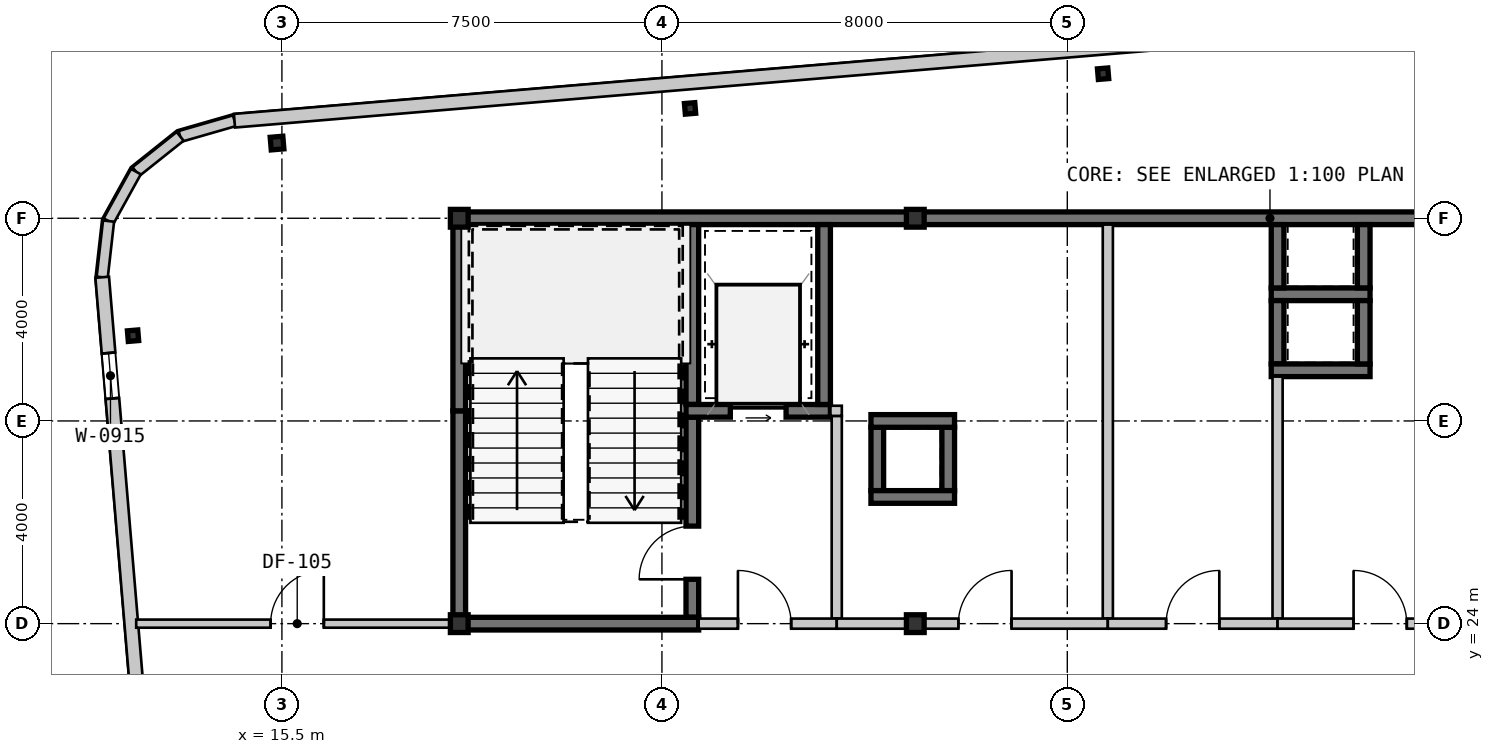
"""IFC4 building model, lengths in metres.
Left out: names, types, materials, properties, quantities, classifications, styles, units other than length and angle.
Written with IfcOpenShell. Run it as: python <this file> out.ifc"""

import sys

from ifc_helpers import new_model, si_unit, direction, frame, frame_2d, origin, origin_2d, place, context, subcontext, project, spatial, rectangle, hollow_rectangle, i_section, extrude, source, transform, mapped, element, fill, save


model = new_model("IFC4")
c1 = context("Model", 3, precision=1e-05, world=origin(), true_north=direction((0.0, 1.0)))
c2 = subcontext(c1, "Body", "Model", "MODEL_VIEW")
j1 = project(units=[si_unit("LENGTHUNIT", "METRE"), si_unit("PLANEANGLEUNIT", "RADIAN")], contexts=[c1])
p1 = place(None, origin())
s1 = spatial("IfcSite", under=j1, at=p1, CompositionType="ELEMENT")
p2 = place(p1, origin())
s2 = spatial("IfcBuilding", under=s1, at=p2, CompositionType="ELEMENT")
p3 = place(p2, frame((0.0, 0.0, 207.2)))
s3 = spatial("IfcBuildingStorey", under=s2, at=p3, CompositionType="ELEMENT", Elevation=207.2)
m1 = source(origin(), c2, "Body", "SweptSolid", [
    extrude(hollow_rectangle(XDim=0.35, YDim=0.35, WallThickness=0.016, at=origin_2d()), origin(), (0.0, 0.0, 1.0), 4.2),
])
for number, where, z_axis, x_axis in (
    (1, (19.0, 24.0, 0.0), (0.0, 0.0, 1.0), (1.0, 0.0, 0.0)),
    (2, (28.0, 24.0, 0.0), (0.0, 0.0, 1.0), (1.0, 0.0, 0.0)),
    (3, (19.0, 32.0, 0.0), (0.0, 0.0, 1.0), (1.0, 0.0, 0.0)),
    (4, (28.0, 32.0, 0.0), (0.0, 0.0, 1.0), (1.0, 0.0, 0.0)),
):
    element("IfcColumn", number, at=place(p3, frame(where, z_axis=z_axis, x_axis=x_axis)), inside=s3, PredefinedType="COLUMN", context=c2, shape_type="MappedRepresentation", body=[
        mapped(m1, transform((0.0, 0.0, 0.0), scale=1.0)),
    ])
m2 = source(origin(), c2, "Body", "SweptSolid", [
    extrude(hollow_rectangle(XDim=0.25, YDim=0.25, WallThickness=0.01, at=origin_2d()), origin(), (0.0, 0.0, 1.0), 4.2),
])
p4 = place(p3, frame((15.404, 33.484, 0.0), z_axis=(0.0, 0.0, 1.0), x_axis=(0.99649285925, 0.083677843332, 0.0)))
e5 = element("IfcColumn", 5, at=p4, inside=s3, PredefinedType="COLUMN", context=c2, shape_type="MappedRepresentation", body=[
    mapped(m2, transform((0.0, 0.0, 0.0), scale=1.0)),
])
m3 = source(origin(), c2, "Body", "SweptSolid", [
    extrude(i_section(OverallWidth=0.205, OverallDepth=0.21, WebThickness=0.009, FlangeThickness=0.014, at=origin_2d()), origin(), (0.0, 0.0, 1.0), 4.2),
])
for number, where, z_axis, x_axis in (
    (6, (23.555, 34.168, 0.0), (0.0, 0.0, 1.0), (0.996, 0.084, 0.0)),
    (7, (31.706, 34.853, 0.0), (0.0, 0.0, 1.0), (0.996, 0.084, 0.0)),
    (8, (12.562, 29.682, 0.0), (0.0, 0.0, 1.0), (0.996, 0.084, 0.0)),
):
    element("IfcColumn", number, at=place(p3, frame(where, z_axis=z_axis, x_axis=x_axis)), inside=s3, PredefinedType="COLUMN", context=c2, shape_type="MappedRepresentation", body=[
        mapped(m3, transform((0.0, 0.0, 0.0), scale=1.0)),
    ])
m4 = source(origin(), c2, "Body", "SweptSolid", [
    extrude(rectangle(XDim=1.116, YDim=0.22, at=frame_2d((0.558, 0.0))), origin(), (0.0, 0.0, 1.0), 3.78),
])
p5 = place(p3, frame((14.564, 33.925, 0.0), z_axis=(0.0, 0.0, 1.0), x_axis=(-0.961010464297, -0.276512002475, 0.0)))
e9 = element("IfcWall", 9, at=p5, inside=s3, PredefinedType="SOLIDWALL", context=c2, shape_type="MappedRepresentation", body=[
    mapped(m4, transform((0.0, 0.0, 0.0), scale=1.0)),
])
m5 = source(origin(), c2, "Body", "SweptSolid", [
    extrude(rectangle(XDim=1.116, YDim=0.22, at=frame_2d((0.558, 0.0))), origin(), (0.0, 0.0, 1.0), 3.78),
])
p6 = place(p3, frame((13.491, 33.616, 0.0), z_axis=(0.0, 0.0, 1.0), x_axis=(-0.782062884215, -0.623199522732, 0.0)))
e10 = element("IfcWall", 10, at=p6, inside=s3, PredefinedType="SOLIDWALL", context=c2, shape_type="MappedRepresentation", body=[
    mapped(m5, transform((0.0, 0.0, 0.0), scale=1.0)),
])
for number, where, z_axis, x_axis in (
    (11, (12.619, 32.921, 0.0), (0.0, 0.0, 1.0), (-0.484, -0.875, 0.0)),
    (12, (12.079, 31.944, 0.0), (0.0, 0.0, 1.0), (-0.112, -0.994, 0.0)),
):
    element("IfcWall", number, at=place(p3, frame(where, z_axis=z_axis, x_axis=x_axis)), inside=s3, PredefinedType="SOLIDWALL", context=c2, shape_type="MappedRepresentation", body=[
        mapped(m4, transform((0.0, 0.0, 0.0), scale=1.0)),
    ])
m6 = source(origin(), c2, "Body", "SweptSolid", [
    extrude(rectangle(XDim=42.5, YDim=0.27, at=frame_2d((21.25, 0.0))), origin(), (0.0, 0.0, 1.0), 3.78),
])
p7 = place(p3, frame((56.915, 37.481, 0.0), z_axis=(0.0, 0.0, 1.0), x_axis=(-0.996492667128, -0.083680131217, 0.0)))
e13 = element("IfcWall", 13, at=p7, inside=s3, PredefinedType="SOLIDWALL", context=c2, shape_type="MappedRepresentation", body=[
    mapped(m6, transform((0.0, 0.0, 0.0), scale=1.0)),
])
m7 = source(origin(), c2, "Body", "SweptSolid", [
    extrude(rectangle(XDim=0.9, YDim=1.5, at=frame_2d((0.45, 0.75))), frame((0.0, 0.145, 0.0), z_axis=(0.0, -1.0, 0.0), x_axis=(1.0, 0.0, 0.0)), (0.0, 0.0, 1.0), 0.29),
])
p8 = place(p7, frame((1.25, 0.0, 1.1)))
e14 = element("IfcOpeningElement", 14, at=p8, cuts=e13, PredefinedType="OPENING", context=c2, shape_type="MappedRepresentation", body=[
    mapped(m7, transform((0.0, 0.0, 0.0), scale=1.0)),
])
m8 = source(origin(), c2, "Body", "SweptSolid", [
    extrude(rectangle(XDim=26.8, YDim=0.27, at=frame_2d((13.4, 0.0))), origin(), (0.0, 0.0, 1.0), 3.78),
])
p9 = place(p3, frame((11.953, 30.835, 0.0), z_axis=(0.0, 0.0, 1.0), x_axis=(0.083673473834, -0.996493226157, 0.0)))
e15 = element("IfcWall", 15, at=p9, inside=s3, PredefinedType="SOLIDWALL", context=c2, shape_type="MappedRepresentation", body=[
    mapped(m8, transform((0.0, 0.0, 0.0), scale=1.0)),
])
p10 = place(p9, frame((1.5, 0.0, 0.7)))
e16 = element("IfcOpeningElement", 16, at=p10, cuts=e15, PredefinedType="OPENING", context=c2, shape_type="MappedRepresentation", body=[
    mapped(m7, transform((0.0, 0.0, 0.0), scale=1.0)),
])
m9 = source(origin(), c2, "Body", "SweptSolid", [
    extrude(rectangle(XDim=9.125, YDim=0.25, at=frame_2d((4.562, 0.0))), origin(), (0.0, 0.0, 1.0), 3.78),
])
p11 = place(p3, frame((18.875, 32.0, 0.0), z_axis=(0.0, 0.0, 1.0), x_axis=(1.0, 0.0, 0.0)))
e17 = element("IfcWall", 17, at=p11, inside=s3, PredefinedType="SHEAR", context=c2, shape_type="MappedRepresentation", body=[
    mapped(m9, transform((0.0, 0.0, 0.0), scale=1.0)),
])
m10 = source(origin(), c2, "Body", "SweptSolid", [
    extrude(rectangle(XDim=11.2, YDim=0.25, at=frame_2d((5.6, 0.0))), origin(), (0.0, 0.0, 1.0), 3.78),
])
p12 = place(p3, frame((28.0, 32.0, 0.0), z_axis=(0.0, 0.0, 1.0), x_axis=(1.0, 0.0, 0.0)))
e18 = element("IfcWall", 18, at=p12, inside=s3, PredefinedType="SHEAR", context=c2, shape_type="MappedRepresentation", body=[
    mapped(m10, transform((0.0, 0.0, 0.0), scale=1.0)),
])
m11 = source(origin(), c2, "Body", "SweptSolid", [
    extrude(rectangle(XDim=4.075, YDim=0.25, at=frame_2d((2.038, 0.0))), origin(), (0.0, 0.0, 1.0), 3.78),
])
p13 = place(p3, frame((19.0, 24.125, 0.0), z_axis=(0.0, 0.0, 1.0), x_axis=(0.0, 1.0, 0.0)))
e19 = element("IfcWall", 19, at=p13, inside=s3, PredefinedType="SHEAR", context=c2, shape_type="MappedRepresentation", body=[
    mapped(m11, transform((0.0, 0.0, 0.0), scale=1.0)),
])
m12 = source(origin(), c2, "Body", "SweptSolid", [
    extrude(rectangle(XDim=3.675, YDim=0.25, at=frame_2d((1.837, 0.0))), origin(), (0.0, 0.0, 1.0), 3.78),
])
p14 = place(p3, frame((19.0, 28.2, 0.0), z_axis=(0.0, 0.0, 1.0), x_axis=(0.0, 1.0, 0.0)))
e20 = element("IfcWall", 20, at=p14, inside=s3, PredefinedType="SHEAR", context=c2, shape_type="MappedRepresentation", body=[
    mapped(m12, transform((0.0, 0.0, 0.0), scale=1.0)),
])
m13 = source(origin(), c2, "Body", "SweptSolid", [
    extrude(rectangle(XDim=3.55, YDim=0.25, at=frame_2d((1.775, 0.0))), origin(), (0.0, 0.0, 1.0), 3.78),
])
p15 = place(p3, frame((23.6, 28.325, 0.0), z_axis=(0.0, 0.0, 1.0), x_axis=(0.0, 1.0, 0.0)))
e21 = element("IfcWall", 21, at=p15, inside=s3, PredefinedType="SHEAR", context=c2, shape_type="MappedRepresentation", body=[
    mapped(m13, transform((0.0, 0.0, 0.0), scale=1.0)),
])
m14 = source(origin(), c2, "Body", "SweptSolid", [
    extrude(rectangle(XDim=3.95, YDim=0.25, at=frame_2d((1.975, 0.0))), origin(), (0.0, 0.0, 1.0), 3.78),
])
p16 = place(p3, frame((23.6, 24.125, 0.0), z_axis=(0.0, 0.0, 1.0), x_axis=(0.0, 1.0, 0.0)))
e22 = element("IfcWall", 22, at=p16, inside=s3, PredefinedType="SHEAR", context=c2, shape_type="MappedRepresentation", body=[
    mapped(m14, transform((0.0, 0.0, 0.0), scale=1.0)),
])
m15 = source(origin(), c2, "Body", "SweptSolid", [
    extrude(rectangle(XDim=1.05, YDim=2.1, at=frame_2d((0.525, 1.05))), frame((0.0, 0.135, 0.0), z_axis=(0.0, -1.0, 0.0), x_axis=(1.0, 0.0, 0.0)), (0.0, 0.0, 1.0), 0.27),
])
p17 = place(p16, frame((0.75, 0.0, 0.0)))
e23 = element("IfcOpeningElement", 23, at=p17, cuts=e22, PredefinedType="OPENING", context=c2, shape_type="MappedRepresentation", body=[
    mapped(m15, transform((0.0, 0.0, 0.0), scale=1.0)),
])
m16 = source(origin(), c2, "Body", "SweptSolid", [
    extrude(rectangle(XDim=4.85, YDim=0.25, at=frame_2d((2.425, 0.0))), origin(), (0.0, 0.0, 1.0), 3.78),
])
p18 = place(p3, frame((18.875, 24.0, 0.0), z_axis=(0.0, 0.0, 1.0), x_axis=(1.0, 0.0, 0.0)))
e24 = element("IfcWall", 24, at=p18, inside=s3, PredefinedType="SHEAR", context=c2, shape_type="MappedRepresentation", body=[
    mapped(m16, transform((0.0, 0.0, 0.0), scale=1.0)),
])
m17 = source(origin(), c2, "Body", "SweptSolid", [
    extrude(rectangle(XDim=2.85, YDim=0.25, at=frame_2d((1.425, 0.0))), origin(), (0.0, 0.0, 1.0), 3.78),
])
p19 = place(p3, frame((23.475, 28.2, 0.0), z_axis=(0.0, 0.0, 1.0), x_axis=(1.0, 0.0, 0.0)))
e25 = element("IfcWall", 25, at=p19, inside=s3, PredefinedType="SHEAR", context=c2, shape_type="MappedRepresentation", body=[
    mapped(m17, transform((0.0, 0.0, 0.0), scale=1.0)),
])
m18 = source(origin(), c2, "Body", "SweptSolid", [
    extrude(rectangle(XDim=1.1, YDim=2.15, at=frame_2d((0.55, 1.075))), frame((0.0, 0.135, 0.0), z_axis=(0.0, -1.0, 0.0), x_axis=(1.0, 0.0, 0.0)), (0.0, 0.0, 1.0), 0.27),
])
p20 = place(p19, frame((0.875, 0.0, 0.0)))
e26 = element("IfcOpeningElement", 26, at=p20, cuts=e25, PredefinedType="OPENING", context=c2, shape_type="MappedRepresentation", body=[
    mapped(m18, transform((0.0, 0.0, 0.0), scale=1.0)),
])
p21 = place(p3, frame((26.2, 28.325, 0.0), z_axis=(0.0, 0.0, 1.0), x_axis=(0.0, 1.0, 0.0)))
e27 = element("IfcWall", 27, at=p21, inside=s3, PredefinedType="SHEAR", context=c2, shape_type="MappedRepresentation", body=[
    mapped(m13, transform((0.0, 0.0, 0.0), scale=1.0)),
])
m19 = source(origin(), c2, "Body", "SweptSolid", [
    extrude(rectangle(XDim=4.0, YDim=0.2, at=frame_2d((2.0, 0.0))), origin(), (0.0, 0.0, 1.0), 3.78),
])
p22 = place(p3, frame((26.45, 24.1, 0.0), z_axis=(0.0, 0.0, 1.0), x_axis=(0.0, 1.0, 0.0)))
e28 = element("IfcWall", 28, at=p22, inside=s3, PredefinedType="SOLIDWALL", context=c2, shape_type="MappedRepresentation", body=[
    mapped(m19, transform((0.0, 0.0, 0.0), scale=1.0)),
])
m20 = source(origin(), c2, "Body", "SweptSolid", [
    extrude(rectangle(XDim=2.725, YDim=0.2, at=frame_2d((1.362, 0.0))), origin(), (0.0, 0.0, 1.0), 3.32),
])
p23 = place(p3, frame((23.725, 24.0, 0.0), z_axis=(0.0, 0.0, 1.0), x_axis=(1.0, 0.0, 0.0)))
e29 = element("IfcWall", 29, at=p23, inside=s3, PredefinedType="SOLIDWALL", context=c2, shape_type="MappedRepresentation", body=[
    mapped(m20, transform((0.0, 0.0, 0.0), scale=1.0)),
])
m21 = source(origin(), c2, "Body", "SweptSolid", [
    extrude(rectangle(XDim=1.05, YDim=2.1, at=frame_2d((0.525, 1.05))), frame((0.0, 0.11, 0.0), z_axis=(0.0, -1.0, 0.0), x_axis=(1.0, 0.0, 0.0)), (0.0, 0.0, 1.0), 0.22),
])
p24 = place(p23, frame((0.775, 0.0, 0.0)))
e30 = element("IfcOpeningElement", 30, at=p24, cuts=e29, PredefinedType="OPENING", context=c2, shape_type="MappedRepresentation", body=[
    mapped(m21, transform((0.0, 0.0, 0.0), scale=1.0)),
])
m22 = source(origin(), c2, "Body", "SweptSolid", [
    extrude(rectangle(XDim=1.95, YDim=0.25, at=frame_2d((0.975, 0.0))), origin(), (0.0, 0.0, 1.0), 3.78),
])
p25 = place(p3, frame((35.025, 30.5, 0.0), z_axis=(0.0, 0.0, 1.0), x_axis=(1.0, 0.0, 0.0)))
e31 = element("IfcWall", 31, at=p25, inside=s3, PredefinedType="SHEAR", context=c2, shape_type="MappedRepresentation", body=[
    mapped(m22, transform((0.0, 0.0, 0.0), scale=1.0)),
])
m23 = source(origin(), c2, "Body", "SweptSolid", [
    extrude(rectangle(XDim=1.25, YDim=0.25, at=frame_2d((0.625, 0.0))), origin(), (0.0, 0.0, 1.0), 3.78),
])
for number, where, z_axis, x_axis in (
    (32, (35.15, 31.875, 0.0), (0.0, 0.0, 1.0), (0.0, -1.0, 0.0)),
    (33, (36.85, 30.625, 0.0), (0.0, 0.0, 1.0), (0.0, 1.0, 0.0)),
    (34, (35.15, 30.375, 0.0), (0.0, 0.0, 1.0), (0.0, -1.0, 0.0)),
):
    element("IfcWall", number, at=place(p3, frame(where, z_axis=z_axis, x_axis=x_axis)), inside=s3, PredefinedType="SHEAR", context=c2, shape_type="MappedRepresentation", body=[
        mapped(m23, transform((0.0, 0.0, 0.0), scale=1.0)),
    ])
p26 = place(p3, frame((35.025, 29.0, 0.0), z_axis=(0.0, 0.0, 1.0), x_axis=(1.0, 0.0, 0.0)))
e35 = element("IfcWall", 35, at=p26, inside=s3, PredefinedType="SHEAR", context=c2, shape_type="MappedRepresentation", body=[
    mapped(m22, transform((0.0, 0.0, 0.0), scale=1.0)),
])
for number, where, z_axis, x_axis in (
    (36, (36.85, 29.125, 0.0), (0.0, 0.0, 1.0), (0.0, 1.0, 0.0)),
    (37, (28.65, 26.625, 0.0), (0.0, 0.0, 1.0), (0.0, 1.0, 0.0)),
    (38, (27.25, 27.875, 0.0), (0.0, 0.0, 1.0), (0.0, -1.0, 0.0)),
):
    element("IfcWall", number, at=place(p3, frame(where, z_axis=z_axis, x_axis=x_axis)), inside=s3, PredefinedType="SHEAR", context=c2, shape_type="MappedRepresentation", body=[
        mapped(m23, transform((0.0, 0.0, 0.0), scale=1.0)),
    ])
m24 = source(origin(), c2, "Body", "SweptSolid", [
    extrude(rectangle(XDim=1.65, YDim=0.25, at=frame_2d((0.825, 0.0))), origin(), (0.0, 0.0, 1.0), 3.78),
])
for number, where, z_axis, x_axis in (
    (39, (28.775, 28.0, 0.0), (0.0, 0.0, 1.0), (-1.0, 0.0, 0.0)),
    (40, (27.125, 26.5, 0.0), (0.0, 0.0, 1.0), (1.0, 0.0, 0.0)),
):
    element("IfcWall", number, at=place(p3, frame(where, z_axis=z_axis, x_axis=x_axis)), inside=s3, PredefinedType="SHEAR", context=c2, shape_type="MappedRepresentation", body=[
        mapped(m24, transform((0.0, 0.0, 0.0), scale=1.0)),
    ])
m25 = source(origin(), c2, "Body", "SweptSolid", [
    extrude(rectangle(XDim=7.775, YDim=0.2, at=frame_2d((3.887, 0.0))), origin(), (0.0, 0.0, 1.0), 3.78),
])
p27 = place(p3, frame((31.8, 31.875, 0.0), z_axis=(0.0, 0.0, 1.0), x_axis=(0.0, -1.0, 0.0)))
e41 = element("IfcWall", 41, at=p27, inside=s3, PredefinedType="SOLIDWALL", context=c2, shape_type="MappedRepresentation", body=[
    mapped(m25, transform((0.0, 0.0, 0.0), scale=1.0)),
])
m26 = source(origin(), c2, "Body", "SweptSolid", [
    extrude(rectangle(XDim=5.35, YDim=0.2, at=frame_2d((2.675, 0.0))), origin(), (0.0, 0.0, 1.0), 3.32),
])
p28 = place(p3, frame((31.8, 24.0, 0.0), z_axis=(0.0, 0.0, 1.0), x_axis=(-1.0, 0.0, 0.0)))
e42 = element("IfcWall", 42, at=p28, inside=s3, PredefinedType="SOLIDWALL", context=c2, shape_type="MappedRepresentation", body=[
    mapped(m26, transform((0.0, 0.0, 0.0), scale=1.0)),
])
p29 = place(p28, frame((1.9, 0.0, 0.0)))
e43 = element("IfcOpeningElement", 43, at=p29, cuts=e42, PredefinedType="OPENING", context=c2, shape_type="MappedRepresentation", body=[
    mapped(m21, transform((0.0, 0.0, 0.0), scale=1.0)),
])
m27 = source(origin(), c2, "Body", "SweptSolid", [
    extrude(rectangle(XDim=4.775, YDim=0.2, at=frame_2d((2.387, 0.0))), origin(), (0.0, 0.0, 1.0), 3.78),
])
p30 = place(p3, frame((35.15, 28.875, 0.0), z_axis=(0.0, 0.0, 1.0), x_axis=(0.0, -1.0, 0.0)))
e44 = element("IfcWall", 44, at=p30, inside=s3, PredefinedType="SOLIDWALL", context=c2, shape_type="MappedRepresentation", body=[
    mapped(m27, transform((0.0, 0.0, 0.0), scale=1.0)),
])
m28 = source(origin(), c2, "Body", "SweptSolid", [
    extrude(rectangle(XDim=3.35, YDim=0.2, at=frame_2d((1.675, 0.0))), origin(), (0.0, 0.0, 1.0), 3.32),
])
p31 = place(p3, frame((35.15, 24.0, 0.0), z_axis=(0.0, 0.0, 1.0), x_axis=(-1.0, 0.0, 0.0)))
e45 = element("IfcWall", 45, at=p31, inside=s3, PredefinedType="SOLIDWALL", context=c2, shape_type="MappedRepresentation", body=[
    mapped(m28, transform((0.0, 0.0, 0.0), scale=1.0)),
])
p32 = place(p31, frame((1.15, 0.0, 0.0)))
e46 = element("IfcOpeningElement", 46, at=p32, cuts=e45, PredefinedType="OPENING", context=c2, shape_type="MappedRepresentation", body=[
    mapped(m21, transform((0.0, 0.0, 0.0), scale=1.0)),
])
m29 = source(origin(), c2, "Body", "SweptSolid", [
    extrude(rectangle(XDim=4.05, YDim=0.2, at=frame_2d((2.025, 0.0))), origin(), (0.0, 0.0, 1.0), 3.32),
])
p33 = place(p3, frame((39.2, 24.0, 0.0), z_axis=(0.0, 0.0, 1.0), x_axis=(-1.0, 0.0, 0.0)))
e47 = element("IfcWall", 47, at=p33, inside=s3, PredefinedType="SOLIDWALL", context=c2, shape_type="MappedRepresentation", body=[
    mapped(m29, transform((0.0, 0.0, 0.0), scale=1.0)),
])
p34 = place(p33, frame((1.5, 0.0, 0.0)))
e48 = element("IfcOpeningElement", 48, at=p34, cuts=e47, PredefinedType="OPENING", context=c2, shape_type="MappedRepresentation", body=[
    mapped(m21, transform((0.0, 0.0, 0.0), scale=1.0)),
])
m30 = source(origin(), c2, "Body", "SweptSolid", [
    extrude(rectangle(XDim=6.251, YDim=0.16, at=frame_2d((3.125, 0.0))), origin(), (0.0, 0.0, 1.0), 3.78),
])
p35 = place(p3, frame((12.624, 24.0, 0.0), z_axis=(0.0, 0.0, 1.0), x_axis=(1.0, 0.0, 0.0)))
e49 = element("IfcWall", 49, at=p35, inside=s3, PredefinedType="PARTITIONING", context=c2, shape_type="MappedRepresentation", body=[
    mapped(m30, transform((0.0, 0.0, 0.0), scale=1.0)),
])
m31 = source(origin(), c2, "Body", "SweptSolid", [
    extrude(rectangle(XDim=1.05, YDim=2.1, at=frame_2d((0.525, 1.05))), frame((0.0, 0.09, 0.0), z_axis=(0.0, -1.0, 0.0), x_axis=(1.0, 0.0, 0.0)), (0.0, 0.0, 1.0), 0.18),
])
p36 = place(p35, frame((2.653, 0.0, 0.0)))
e50 = element("IfcOpeningElement", 50, at=p36, cuts=e49, PredefinedType="OPENING", context=c2, shape_type="MappedRepresentation", body=[
    mapped(m31, transform((0.0, 0.0, 0.0), scale=1.0)),
])
m32 = source(origin(), c2, "Body", "SweptSolid", [
    extrude(rectangle(XDim=0.225, YDim=0.2, at=frame_2d((0.113, 0.0))), origin(), (0.0, 0.0, 1.0), 3.78),
])
p37 = place(p3, frame((26.325, 28.2, 0.0), z_axis=(0.0, 0.0, 1.0), x_axis=(1.0, 0.0, 0.0)))
e51 = element("IfcWall", 51, at=p37, inside=s3, PredefinedType="SOLIDWALL", context=c2, shape_type="MappedRepresentation", body=[
    mapped(m32, transform((0.0, 0.0, 0.0), scale=1.0)),
])
m33 = source(origin(), c2, "Body", "SweptSolid", [
    extrude(rectangle(XDim=0.9, YDim=1.5, at=frame_2d((0.45, 0.75))), frame((0.0, 0.03, 0.0), z_axis=(0.0, -1.0, 0.0), x_axis=(1.0, 0.0, 0.0)), (0.0, 0.0, 1.0), 0.06),
])
p38 = place(p10, origin())
e52 = element("IfcWindow", 52, at=p38, inside=s3, PartitioningType="SINGLE_PANEL", PredefinedType="WINDOW", context=c2, shape_type="MappedRepresentation", body=[
    mapped(m33, transform((0.0, 0.0, 0.0), scale=1.0)),
])
fill(e16, e52)
m34 = source(origin(), c2, "Body", "SweptSolid", [
    extrude(rectangle(XDim=1.05, YDim=2.1, at=frame_2d((0.525, 1.05))), frame((0.0, 0.025, 0.0), z_axis=(0.0, -1.0, 0.0), x_axis=(1.0, 0.0, 0.0)), (0.0, 0.0, 1.0), 0.05),
])
p39 = place(p17, origin())
e53 = element("IfcDoor", 53, at=p39, inside=s3, OperationType="SINGLE_SWING_LEFT", PredefinedType="DOOR", context=c2, shape_type="MappedRepresentation", body=[
    mapped(m34, transform((0.0, 0.0, 0.0), scale=1.0)),
])
fill(e23, e53)
m35 = source(origin(), c2, "Body", "SweptSolid", [
    extrude(rectangle(XDim=1.1, YDim=2.15, at=frame_2d((0.55, 1.075))), frame((0.0, 0.025, 0.0), z_axis=(0.0, -1.0, 0.0), x_axis=(1.0, 0.0, 0.0)), (0.0, 0.0, 1.0), 0.05),
])
p40 = place(p20, origin())
e54 = element("IfcDoor", 54, at=p40, inside=s3, OperationType="SLIDING_TO_LEFT", PredefinedType="DOOR", context=c2, shape_type="MappedRepresentation", body=[
    mapped(m35, transform((0.0, 0.0, 0.0), scale=1.0)),
])
fill(e26, e54)
p41 = place(p24, origin())
e55 = element("IfcDoor", 55, at=p41, inside=s3, OperationType="SINGLE_SWING_LEFT", PredefinedType="DOOR", context=c2, shape_type="MappedRepresentation", body=[
    mapped(m34, transform((0.0, 0.0, 0.0), scale=1.0)),
])
fill(e30, e55)
p42 = place(p29, frame((1.05, 0.0, 0.0), z_axis=(0.0, 0.0, 1.0), x_axis=(-1.0, 0.0, 0.0)))
e56 = element("IfcDoor", 56, at=p42, inside=s3, OperationType="SINGLE_SWING_RIGHT", PredefinedType="DOOR", context=c2, shape_type="MappedRepresentation", body=[
    mapped(m34, transform((0.0, 0.0, 0.0), scale=1.0)),
])
fill(e43, e56)
p43 = place(p32, frame((1.05, 0.0, 0.0), z_axis=(0.0, 0.0, 1.0), x_axis=(-1.0, 0.0, 0.0)))
e57 = element("IfcDoor", 57, at=p43, inside=s3, OperationType="SINGLE_SWING_RIGHT", PredefinedType="DOOR", context=c2, shape_type="MappedRepresentation", body=[
    mapped(m34, transform((0.0, 0.0, 0.0), scale=1.0)),
])
fill(e46, e57)
p44 = place(p34, frame((1.05, 0.0, 0.0), z_axis=(0.0, 0.0, 1.0), x_axis=(-1.0, 0.0, 0.0)))
e58 = element("IfcDoor", 58, at=p44, inside=s3, OperationType="SINGLE_SWING_LEFT", PredefinedType="DOOR", context=c2, shape_type="MappedRepresentation", body=[
    mapped(m34, transform((0.0, 0.0, 0.0), scale=1.0)),
])
fill(e48, e58)
p45 = place(p36, origin())
e59 = element("IfcDoor", 59, at=p45, inside=s3, OperationType="SINGLE_SWING_RIGHT", PredefinedType="DOOR", context=c2, shape_type="MappedRepresentation", body=[
    mapped(m34, transform((0.0, 0.0, 0.0), scale=1.0)),
])
fill(e50, e59)
save(model, sys.argv[1])
